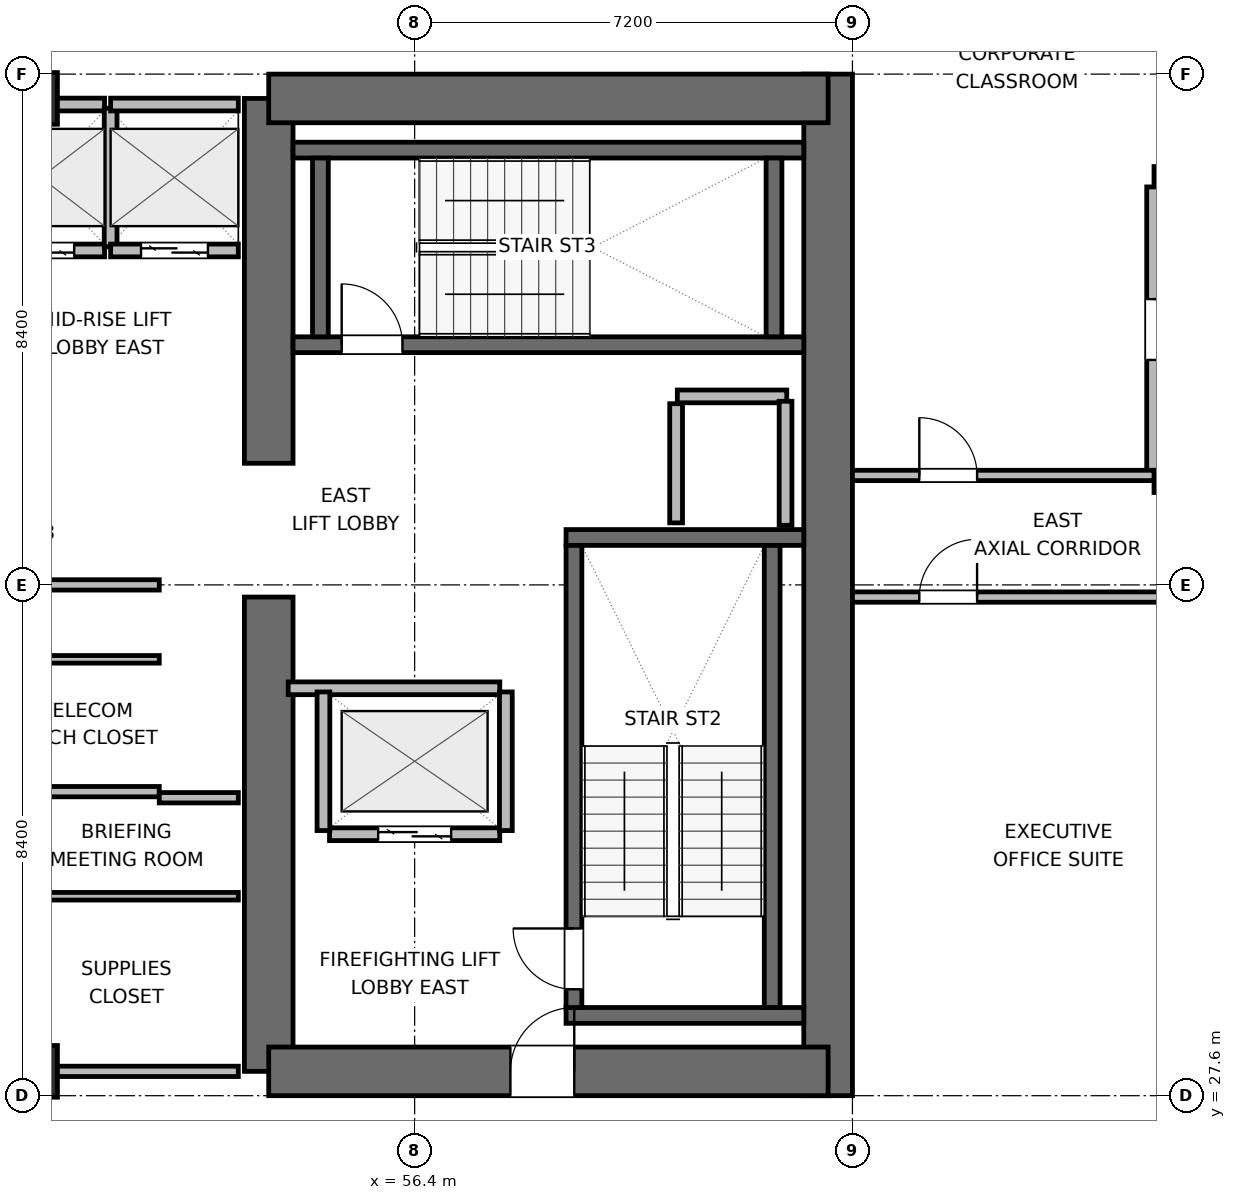
"""IFC4 building model, lengths in metres.
Left out: names, types, materials, properties, quantities, classifications, styles, units other than length and angle.
Written with IfcOpenShell. Run it as: python <this file> out.ifc"""

import sys

from ifc_helpers import new_model, si_unit, direction, frame, frame_2d, origin, origin_2d, place, context, subcontext, project, spatial, rectangle, extrude, element, fill, save


model = new_model("IFC4")
c1 = context("Model", 3, precision=1e-05, world=origin(), true_north=direction((0.0, 1.0)))
c2 = subcontext(c1, "Body", "Model", "MODEL_VIEW")
j1 = project(units=[si_unit("LENGTHUNIT", "METRE"), si_unit("PLANEANGLEUNIT", "RADIAN")], contexts=[c1])
p1 = place(None, origin())
s1 = spatial("IfcSite", under=j1, at=p1, CompositionType="ELEMENT")
p2 = place(p1, origin())
s2 = spatial("IfcBuilding", under=s1, at=p2, CompositionType="ELEMENT")
p3 = place(p2, frame((0.0, 0.0, 170.1)))
s3 = spatial("IfcBuildingStorey", under=s2, at=p3, CompositionType="ELEMENT", Elevation=170.1)
p4 = place(p3, frame((54.0, 28.0, 0.0), z_axis=(0.0, 0.0, 1.0), x_axis=(0.0, 1.0, 0.0)))
e1 = element("IfcWall", 1, at=p4, inside=s3, PredefinedType="SHEAR", context=c2, shape_type="SweptSolid", body=[
    extrude(rectangle(XDim=7.8, YDim=0.8, at=frame_2d((3.9, 0.0))), origin(), (0.0, 0.0, 1.0), 3.9),
])
p5 = place(p3, frame((54.0, 38.0, 0.0), z_axis=(0.0, 0.0, 1.0), x_axis=(0.0, 1.0, 0.0)))
e2 = element("IfcWall", 2, at=p5, inside=s3, PredefinedType="SHEAR", context=c2, shape_type="SweptSolid", body=[
    extrude(rectangle(XDim=6.0, YDim=0.8, at=frame_2d((3.0, 0.0))), origin(), (0.0, 0.0, 1.0), 3.9),
])
p6 = place(p3, frame((63.2, 27.6, 0.0), z_axis=(0.0, 0.0, 1.0), x_axis=(0.0, 1.0, 0.0)))
e3 = element("IfcWall", 3, at=p6, inside=s3, PredefinedType="SHEAR", context=c2, shape_type="SweptSolid", body=[
    extrude(rectangle(XDim=16.8, YDim=0.8, at=frame_2d((8.4, 0.0))), origin(), (0.0, 0.0, 1.0), 3.9),
])
p7 = place(p3, frame((54.0, 28.0, 0.0), z_axis=(0.0, 0.0, 1.0), x_axis=(1.0, 0.0, 0.0)))
e4 = element("IfcWall", 4, at=p7, inside=s3, PredefinedType="SHEAR", context=c2, shape_type="SweptSolid", body=[
    extrude(rectangle(XDim=9.2, YDim=0.8, at=frame_2d((4.6, 0.0))), origin(), (0.0, 0.0, 1.0), 3.9),
])
p8 = place(p7, frame((3.975, 0.0, 0.0)))
e5 = element("IfcOpeningElement", 5, at=p8, cuts=e4, PredefinedType="OPENING", context=c2, shape_type="SweptSolid", body=[
    extrude(rectangle(XDim=1.05, YDim=2.04, at=frame_2d((0.525, 1.02))), frame((0.0, 0.41, 0.0), z_axis=(0.0, -1.0, 0.0), x_axis=(1.0, 0.0, 0.0)), (0.0, 0.0, 1.0), 0.82),
])
p9 = place(p3, frame((54.0, 44.0, 0.0), z_axis=(0.0, 0.0, 1.0), x_axis=(1.0, 0.0, 0.0)))
e6 = element("IfcWall", 6, at=p9, inside=s3, PredefinedType="SHEAR", context=c2, shape_type="SweptSolid", body=[
    extrude(rectangle(XDim=9.2, YDim=0.8, at=frame_2d((4.6, 0.0))), origin(), (0.0, 0.0, 1.0), 3.9),
])
for number, where, z_axis, x_axis in (
    (7, (58.89, 28.92, 0.0), (0.0, 0.0, 1.0), (1.0, 0.0, 0.0)),
    (8, (58.89, 36.78, 0.0), (0.0, 0.0, 1.0), (1.0, 0.0, 0.0)),
):
    element("IfcWall", number, at=place(p3, frame(where, z_axis=z_axis, x_axis=x_axis)), inside=s3, PredefinedType="SHEAR", context=c2, shape_type="SweptSolid", body=[
        extrude(rectangle(XDim=3.91, YDim=0.26, at=frame_2d((1.955, 0.0))), origin(), (0.0, 0.0, 1.0), 3.9),
    ])
p10 = place(p3, frame((59.02, 29.05, 0.0), z_axis=(0.0, 0.0, 1.0), x_axis=(0.0, 1.0, 0.0)))
e9 = element("IfcWall", 9, at=p10, inside=s3, PredefinedType="SHEAR", context=c2, shape_type="SweptSolid", body=[
    extrude(rectangle(XDim=7.6, YDim=0.26, at=frame_2d((3.8, 0.0))), origin(), (0.0, 0.0, 1.0), 3.9),
])
p11 = place(p10, frame((0.3, 0.0, 0.0)))
e10 = element("IfcOpeningElement", 10, at=p11, cuts=e9, PredefinedType="OPENING", context=c2, shape_type="SweptSolid", body=[
    extrude(rectangle(XDim=1.0, YDim=2.04, at=frame_2d((0.5, 1.02))), frame((0.0, 0.14, 0.0), z_axis=(0.0, -1.0, 0.0), x_axis=(1.0, 0.0, 0.0)), (0.0, 0.0, 1.0), 0.28),
])
p12 = place(p3, frame((62.28, 29.05, 0.0), z_axis=(0.0, 0.0, 1.0), x_axis=(0.0, 1.0, 0.0)))
e11 = element("IfcWall", 11, at=p12, inside=s3, PredefinedType="SHEAR", context=c2, shape_type="SweptSolid", body=[
    extrude(rectangle(XDim=7.6, YDim=0.26, at=frame_2d((3.8, 0.0))), origin(), (0.0, 0.0, 1.0), 3.9),
])
p13 = place(p3, frame((54.4, 39.95, 0.0), z_axis=(0.0, 0.0, 1.0), x_axis=(1.0, 0.0, 0.0)))
e12 = element("IfcWall", 12, at=p13, inside=s3, PredefinedType="SHEAR", context=c2, shape_type="SweptSolid", body=[
    extrude(rectangle(XDim=8.4, YDim=0.26, at=frame_2d((4.2, 0.0))), origin(), (0.0, 0.0, 1.0), 3.9),
])
p14 = place(p13, frame((0.8, 0.0, 0.0)))
e13 = element("IfcOpeningElement", 13, at=p14, cuts=e12, PredefinedType="OPENING", context=c2, shape_type="SweptSolid", body=[
    extrude(rectangle(XDim=1.0, YDim=2.04, at=frame_2d((0.5, 1.02))), frame((0.0, 0.14, 0.0), z_axis=(0.0, -1.0, 0.0), x_axis=(1.0, 0.0, 0.0)), (0.0, 0.0, 1.0), 0.28),
])
p15 = place(p3, frame((54.4, 43.15, 0.0), z_axis=(0.0, 0.0, 1.0), x_axis=(1.0, 0.0, 0.0)))
e14 = element("IfcWall", 14, at=p15, inside=s3, PredefinedType="SHEAR", context=c2, shape_type="SweptSolid", body=[
    extrude(rectangle(XDim=8.4, YDim=0.26, at=frame_2d((4.2, 0.0))), origin(), (0.0, 0.0, 1.0), 3.9),
])
for number, where, z_axis, x_axis in (
    (15, (54.85, 40.08, 0.0), (0.0, 0.0, 1.0), (0.0, 1.0, 0.0)),
    (16, (62.31, 40.08, 0.0), (0.0, 0.0, 1.0), (0.0, 1.0, 0.0)),
):
    element("IfcWall", number, at=place(p3, frame(where, z_axis=z_axis, x_axis=x_axis)), inside=s3, PredefinedType="SHEAR", context=c2, shape_type="SweptSolid", body=[
        extrude(rectangle(XDim=2.94, YDim=0.26, at=frame_2d((1.47, 0.0))), origin(), (0.0, 0.0, 1.0), 3.9),
    ])
for number, where, z_axis, x_axis in (
    (17, (50.1, 28.0, 0.0), (0.0, 0.0, 1.0), (1.0, 0.0, 0.0)),
    (18, (50.1, 44.0, 0.0), (0.0, 0.0, 1.0), (1.0, 0.0, 0.0)),
):
    element("IfcColumn", number, at=place(p3, frame(where, z_axis=z_axis, x_axis=x_axis)), inside=s3, PredefinedType="COLUMN", context=c2, shape_type="SweptSolid", body=[
        extrude(rectangle(XDim=0.85, YDim=0.85, at=origin_2d()), origin(), (0.0, 0.0, 1.0), 3.9),
    ])
p16 = place(p3, frame((70.66, 42.74, 0.0), z_axis=(0.0, 0.0, 1.0), x_axis=(-1.0, 0.0, 0.0)))
e19 = element("IfcWall", 19, at=p16, inside=s3, PredefinedType="SOLIDWALL", context=c2, shape_type="SweptSolid", body=[
    extrude(rectangle(XDim=2.1, YDim=0.28, at=frame_2d((1.05, 0.0))), origin(), (0.0, 0.0, 1.0), 3.116),
])
p17 = place(p3, frame((68.56, 42.545, 0.0), z_axis=(0.0, 0.0, 1.0), x_axis=(0.0, -1.0, 0.0)))
e20 = element("IfcWall", 20, at=p17, inside=s3, PredefinedType="SOLIDWALL", context=c2, shape_type="SweptSolid", body=[
    extrude(rectangle(XDim=4.69, YDim=0.24, at=frame_2d((2.345, 0.0))), origin(), (0.0, 0.0, 1.0), 3.248),
])
p18 = place(p17, frame((1.845, 0.0, 0.0)))
e21 = element("IfcOpeningElement", 21, at=p18, cuts=e20, PredefinedType="OPENING", context=c2, shape_type="SweptSolid", body=[
    extrude(rectangle(XDim=1.0, YDim=2.02, at=frame_2d((0.5, 1.01))), frame((0.0, 0.13, 0.0), z_axis=(0.0, -1.0, 0.0), x_axis=(1.0, 0.0, 0.0)), (0.0, 0.0, 1.0), 0.26),
])
p19 = place(p3, frame((68.56, 37.66, 0.0), z_axis=(0.0, 0.0, 1.0), x_axis=(1.0, 0.0, 0.0)))
e22 = element("IfcWall", 22, at=p19, inside=s3, PredefinedType="SOLIDWALL", context=c2, shape_type="SweptSolid", body=[
    extrude(rectangle(XDim=2.1, YDim=0.28, at=frame_2d((1.05, 0.0))), origin(), (0.0, 0.0, 1.0), 3.116),
])
p20 = place(p3, frame((60.72, 39.1, 0.0), z_axis=(0.0, 0.0, 1.0), x_axis=(1.0, 0.0, 0.0)))
e23 = element("IfcWall", 23, at=p20, inside=s3, PredefinedType="PARTITIONING", context=c2, shape_type="SweptSolid", body=[
    extrude(rectangle(XDim=1.8, YDim=0.21, at=frame_2d((0.9, 0.0))), origin(), (0.0, 0.0, 1.0), 3.68),
])
p21 = place(p3, frame((60.7, 37.02, 0.0), z_axis=(0.0, 0.0, 1.0), x_axis=(0.0, 1.0, 0.0)))
e24 = element("IfcWall", 24, at=p21, inside=s3, PredefinedType="PARTITIONING", context=c2, shape_type="SweptSolid", body=[
    extrude(rectangle(XDim=1.96, YDim=0.21, at=frame_2d((0.98, 0.0))), origin(), (0.0, 0.0, 1.0), 3.68),
])
p22 = place(p3, frame((62.5, 36.98, 0.0), z_axis=(0.0, 0.0, 1.0), x_axis=(0.0, 1.0, 0.0)))
e25 = element("IfcWall", 25, at=p22, inside=s3, PredefinedType="PARTITIONING", context=c2, shape_type="SweptSolid", body=[
    extrude(rectangle(XDim=2.04, YDim=0.21, at=frame_2d((1.02, 0.0))), origin(), (0.0, 0.0, 1.0), 3.68),
])
p23 = place(p3, frame((55.0, 31.9, 0.0), z_axis=(0.0, 0.0, 1.0), x_axis=(1.0, 0.0, 0.0)))
e26 = element("IfcWall", 26, at=p23, inside=s3, PredefinedType="PARTITIONING", context=c2, shape_type="SweptSolid", body=[
    extrude(rectangle(XDim=2.8, YDim=0.21, at=frame_2d((1.4, 0.0))), origin(), (0.0, 0.0, 1.0), 3.68),
])
p24 = place(p23, frame((0.8, 0.0, 0.0)))
e27 = element("IfcOpeningElement", 27, at=p24, cuts=e26, PredefinedType="OPENING", context=c2, shape_type="SweptSolid", body=[
    extrude(rectangle(XDim=1.2, YDim=2.04, at=frame_2d((0.6, 1.02))), frame((0.0, 0.115, 0.0), z_axis=(0.0, -1.0, 0.0), x_axis=(1.0, 0.0, 0.0)), (0.0, 0.0, 1.0), 0.23),
])
p25 = place(p3, frame((54.32, 34.3, 0.0), z_axis=(0.0, 0.0, 1.0), x_axis=(1.0, 0.0, 0.0)))
e28 = element("IfcWall", 28, at=p25, inside=s3, PredefinedType="PARTITIONING", context=c2, shape_type="SweptSolid", body=[
    extrude(rectangle(XDim=3.48, YDim=0.21, at=frame_2d((1.74, 0.0))), origin(), (0.0, 0.0, 1.0), 3.68),
])
for number, where, z_axis, x_axis in (
    (29, (54.9, 31.96, 0.0), (0.0, 0.0, 1.0), (0.0, 1.0, 0.0)),
    (30, (57.9, 31.96, 0.0), (0.0, 0.0, 1.0), (0.0, 1.0, 0.0)),
):
    element("IfcWall", number, at=place(p3, frame(where, z_axis=z_axis, x_axis=x_axis)), inside=s3, PredefinedType="PARTITIONING", context=c2, shape_type="SweptSolid", body=[
        extrude(rectangle(XDim=2.28, YDim=0.21, at=frame_2d((1.14, 0.0))), origin(), (0.0, 0.0, 1.0), 3.68),
    ])
p26 = place(p3, frame((49.2, 41.5, 0.0), z_axis=(0.0, 0.0, 1.0), x_axis=(1.0, 0.0, 0.0)))
e31 = element("IfcWall", 31, at=p26, inside=s3, PredefinedType="PARTITIONING", context=c2, shape_type="SweptSolid", body=[
    extrude(rectangle(XDim=2.1, YDim=0.21, at=frame_2d((1.05, 0.0))), origin(), (0.0, 0.0, 1.0), 3.68),
])
p27 = place(p26, frame((0.5, 0.0, 0.0)))
e32 = element("IfcOpeningElement", 32, at=p27, cuts=e31, PredefinedType="OPENING", context=c2, shape_type="SweptSolid", body=[
    extrude(rectangle(XDim=1.1, YDim=2.04, at=frame_2d((0.55, 1.02))), frame((0.0, 0.115, 0.0), z_axis=(0.0, -1.0, 0.0), x_axis=(1.0, 0.0, 0.0)), (0.0, 0.0, 1.0), 0.23),
])
p28 = place(p3, frame((49.2, 43.9, 0.0), z_axis=(0.0, 0.0, 1.0), x_axis=(1.0, 0.0, 0.0)))
e33 = element("IfcWall", 33, at=p28, inside=s3, PredefinedType="PARTITIONING", context=c2, shape_type="SweptSolid", body=[
    extrude(rectangle(XDim=2.1, YDim=0.21, at=frame_2d((1.05, 0.0))), origin(), (0.0, 0.0, 1.0), 2.765),
])
p29 = place(p3, frame((51.4, 41.56, 0.0), z_axis=(0.0, 0.0, 1.0), x_axis=(0.0, 1.0, 0.0)))
e34 = element("IfcWall", 34, at=p29, inside=s3, PredefinedType="PARTITIONING", context=c2, shape_type="SweptSolid", body=[
    extrude(rectangle(XDim=2.28, YDim=0.21, at=frame_2d((1.14, 0.0))), origin(), (0.0, 0.0, 1.0), 3.68),
])
p30 = place(p3, frame((51.4, 41.5, 0.0), z_axis=(0.0, 0.0, 1.0), x_axis=(1.0, 0.0, 0.0)))
e35 = element("IfcWall", 35, at=p30, inside=s3, PredefinedType="PARTITIONING", context=c2, shape_type="SweptSolid", body=[
    extrude(rectangle(XDim=2.1, YDim=0.21, at=frame_2d((1.05, 0.0))), origin(), (0.0, 0.0, 1.0), 3.68),
])
p31 = place(p30, frame((0.5, 0.0, 0.0)))
e36 = element("IfcOpeningElement", 36, at=p31, cuts=e35, PredefinedType="OPENING", context=c2, shape_type="SweptSolid", body=[
    extrude(rectangle(XDim=1.1, YDim=2.04, at=frame_2d((0.55, 1.02))), frame((0.0, 0.115, 0.0), z_axis=(0.0, -1.0, 0.0), x_axis=(1.0, 0.0, 0.0)), (0.0, 0.0, 1.0), 0.23),
])
p32 = place(p3, frame((51.4, 43.9, 0.0), z_axis=(0.0, 0.0, 1.0), x_axis=(1.0, 0.0, 0.0)))
e37 = element("IfcWall", 37, at=p32, inside=s3, PredefinedType="PARTITIONING", context=c2, shape_type="SweptSolid", body=[
    extrude(rectangle(XDim=2.1, YDim=0.21, at=frame_2d((1.05, 0.0))), origin(), (0.0, 0.0, 1.0), 2.765),
])
for number, where, z_axis, x_axis in (
    (38, (49.287, 32.6, 0.0), (0.0, 0.0, 1.0), (1.0, 0.0, 0.0)),
    (39, (49.287, 36.0, 0.0), (0.0, 0.0, 1.0), (1.0, 0.0, 0.0)),
):
    element("IfcWall", number, at=place(p3, frame(where, z_axis=z_axis, x_axis=x_axis)), inside=s3, PredefinedType="PARTITIONING", context=c2, shape_type="SweptSolid", body=[
        extrude(rectangle(XDim=2.913, YDim=0.17, at=frame_2d((1.457, 0.0))), origin(), (0.0, 0.0, 1.0), 3.68),
    ])
p33 = place(p3, frame((49.287, 34.776, 0.0), z_axis=(0.0, 0.0, 1.0), x_axis=(1.0, 0.0, 0.0)))
e40 = element("IfcWall", 40, at=p33, inside=s3, PredefinedType="PARTITIONING", context=c2, shape_type="SweptSolid", body=[
    extrude(rectangle(XDim=2.913, YDim=0.125, at=frame_2d((1.457, 0.0))), origin(), (0.0, 0.0, 1.0), 3.68),
])
p34 = place(p3, frame((49.287, 28.0, 0.0), z_axis=(0.0, 0.0, 1.0), x_axis=(1.0, 0.0, 0.0)))
e41 = element("IfcWall", 41, at=p34, inside=s3, PredefinedType="PARTITIONING", context=c2, shape_type="SweptSolid", body=[
    extrude(rectangle(XDim=4.213, YDim=0.17, at=frame_2d((2.106, 0.0))), origin(), (0.0, 0.0, 1.0), 2.765),
])
p35 = place(p3, frame((52.2, 32.5, 0.0), z_axis=(0.0, 0.0, 1.0), x_axis=(1.0, 0.0, 0.0)))
e42 = element("IfcWall", 42, at=p35, inside=s3, PredefinedType="PARTITIONING", context=c2, shape_type="SweptSolid", body=[
    extrude(rectangle(XDim=1.3, YDim=0.17, at=frame_2d((0.65, 0.0))), origin(), (0.0, 0.0, 1.0), 3.68),
])
p36 = place(p3, frame((49.287, 30.88, 0.0), z_axis=(0.0, 0.0, 1.0), x_axis=(1.0, 0.0, 0.0)))
e43 = element("IfcWall", 43, at=p36, inside=s3, PredefinedType="PARTITIONING", context=c2, shape_type="SweptSolid", body=[
    extrude(rectangle(XDim=4.213, YDim=0.125, at=frame_2d((2.106, 0.0))), origin(), (0.0, 0.0, 1.0), 3.68),
])
p37 = place(p3, frame((63.6, 35.8, 0.0), z_axis=(0.0, 0.0, 1.0), x_axis=(1.0, 0.0, 0.0)))
e44 = element("IfcWall", 44, at=p37, inside=s3, PredefinedType="PARTITIONING", context=c2, shape_type="SweptSolid", body=[
    extrude(rectangle(XDim=6.975, YDim=0.17, at=frame_2d((3.487, 0.0))), origin(), (0.0, 0.0, 1.0), 3.043),
])
p38 = place(p37, frame((1.1, 0.0, 0.0)))
e45 = element("IfcOpeningElement", 45, at=p38, cuts=e44, PredefinedType="OPENING", context=c2, shape_type="SweptSolid", body=[
    extrude(rectangle(XDim=0.95, YDim=2.04, at=frame_2d((0.475, 1.02))), frame((0.0, 0.095, 0.0), z_axis=(0.0, -1.0, 0.0), x_axis=(1.0, 0.0, 0.0)), (0.0, 0.0, 1.0), 0.19),
])
p39 = place(p3, frame((63.6, 37.8, 0.0), z_axis=(0.0, 0.0, 1.0), x_axis=(1.0, 0.0, 0.0)))
e46 = element("IfcWall", 46, at=p39, inside=s3, PredefinedType="PARTITIONING", context=c2, shape_type="SweptSolid", body=[
    extrude(rectangle(XDim=4.96, YDim=0.17, at=frame_2d((2.48, 0.0))), origin(), (0.0, 0.0, 1.0), 3.68),
])
p40 = place(p39, frame((1.1, 0.0, 0.0)))
e47 = element("IfcOpeningElement", 47, at=p40, cuts=e46, PredefinedType="OPENING", context=c2, shape_type="SweptSolid", body=[
    extrude(rectangle(XDim=0.95, YDim=2.04, at=frame_2d((0.475, 1.02))), frame((0.0, 0.095, 0.0), z_axis=(0.0, -1.0, 0.0), x_axis=(1.0, 0.0, 0.0)), (0.0, 0.0, 1.0), 0.19),
])
p41 = place(p18, origin())
e48 = element("IfcDoor", 48, at=p41, inside=s3, OperationType="SINGLE_SWING_LEFT", PredefinedType="DOOR", context=c2, shape_type="SweptSolid", body=[
    extrude(rectangle(XDim=1.0, YDim=2.02, at=frame_2d((0.5, 1.01))), frame((0.0, 0.025, 0.0), z_axis=(0.0, -1.0, 0.0), x_axis=(1.0, 0.0, 0.0)), (0.0, 0.0, 1.0), 0.05),
])
fill(e21, e48)
p42 = place(p11, origin())
e49 = element("IfcDoor", 49, at=p42, inside=s3, OperationType="SINGLE_SWING_RIGHT", PredefinedType="DOOR", context=c2, shape_type="SweptSolid", body=[
    extrude(rectangle(XDim=1.0, YDim=2.04, at=frame_2d((0.5, 1.02))), frame((0.0, 0.025, 0.0), z_axis=(0.0, -1.0, 0.0), x_axis=(1.0, 0.0, 0.0)), (0.0, 0.0, 1.0), 0.05),
])
fill(e10, e49)
p43 = place(p14, origin())
e50 = element("IfcDoor", 50, at=p43, inside=s3, OperationType="SINGLE_SWING_LEFT", PredefinedType="DOOR", context=c2, shape_type="SweptSolid", body=[
    extrude(rectangle(XDim=1.0, YDim=2.04, at=frame_2d((0.5, 1.02))), frame((0.0, 0.025, 0.0), z_axis=(0.0, -1.0, 0.0), x_axis=(1.0, 0.0, 0.0)), (0.0, 0.0, 1.0), 0.05),
])
fill(e13, e50)
p44 = place(p24, origin())
e51 = element("IfcDoor", 51, at=p44, inside=s3, OperationType="DOUBLE_DOOR_SLIDING", PredefinedType="DOOR", context=c2, shape_type="SweptSolid", body=[
    extrude(rectangle(XDim=1.2, YDim=2.04, at=frame_2d((0.6, 1.02))), frame((0.0, 0.025, 0.0), z_axis=(0.0, -1.0, 0.0), x_axis=(1.0, 0.0, 0.0)), (0.0, 0.0, 1.0), 0.05),
])
fill(e27, e51)
p45 = place(p27, origin())
e52 = element("IfcDoor", 52, at=p45, inside=s3, OperationType="DOUBLE_DOOR_SLIDING", PredefinedType="DOOR", context=c2, shape_type="SweptSolid", body=[
    extrude(rectangle(XDim=1.1, YDim=2.04, at=frame_2d((0.55, 1.02))), frame((0.0, 0.025, 0.0), z_axis=(0.0, -1.0, 0.0), x_axis=(1.0, 0.0, 0.0)), (0.0, 0.0, 1.0), 0.05),
])
fill(e32, e52)
p46 = place(p31, origin())
e53 = element("IfcDoor", 53, at=p46, inside=s3, OperationType="DOUBLE_DOOR_SLIDING", PredefinedType="DOOR", context=c2, shape_type="SweptSolid", body=[
    extrude(rectangle(XDim=1.1, YDim=2.04, at=frame_2d((0.55, 1.02))), frame((0.0, 0.025, 0.0), z_axis=(0.0, -1.0, 0.0), x_axis=(1.0, 0.0, 0.0)), (0.0, 0.0, 1.0), 0.05),
])
fill(e36, e53)
p47 = place(p8, origin())
e54 = element("IfcDoor", 54, at=p47, inside=s3, OperationType="SINGLE_SWING_RIGHT", PredefinedType="DOOR", context=c2, shape_type="SweptSolid", body=[
    extrude(rectangle(XDim=1.05, YDim=2.04, at=frame_2d((0.525, 1.02))), frame((0.0, 0.025, 0.0), z_axis=(0.0, -1.0, 0.0), x_axis=(1.0, 0.0, 0.0)), (0.0, 0.0, 1.0), 0.05),
])
fill(e5, e54)
p48 = place(p38, origin())
e55 = element("IfcDoor", 55, at=p48, inside=s3, OperationType="SINGLE_SWING_RIGHT", PredefinedType="DOOR", context=c2, shape_type="SweptSolid", body=[
    extrude(rectangle(XDim=0.95, YDim=2.04, at=frame_2d((0.475, 1.02))), frame((0.0, 0.025, 0.0), z_axis=(0.0, -1.0, 0.0), x_axis=(1.0, 0.0, 0.0)), (0.0, 0.0, 1.0), 0.05),
])
fill(e45, e55)
p49 = place(p40, origin())
e56 = element("IfcDoor", 56, at=p49, inside=s3, OperationType="SINGLE_SWING_LEFT", PredefinedType="DOOR", context=c2, shape_type="SweptSolid", body=[
    extrude(rectangle(XDim=0.95, YDim=2.04, at=frame_2d((0.475, 1.02))), frame((0.0, 0.025, 0.0), z_axis=(0.0, -1.0, 0.0), x_axis=(1.0, 0.0, 0.0)), (0.0, 0.0, 1.0), 0.05),
])
fill(e47, e56)
save(model, sys.argv[1])
